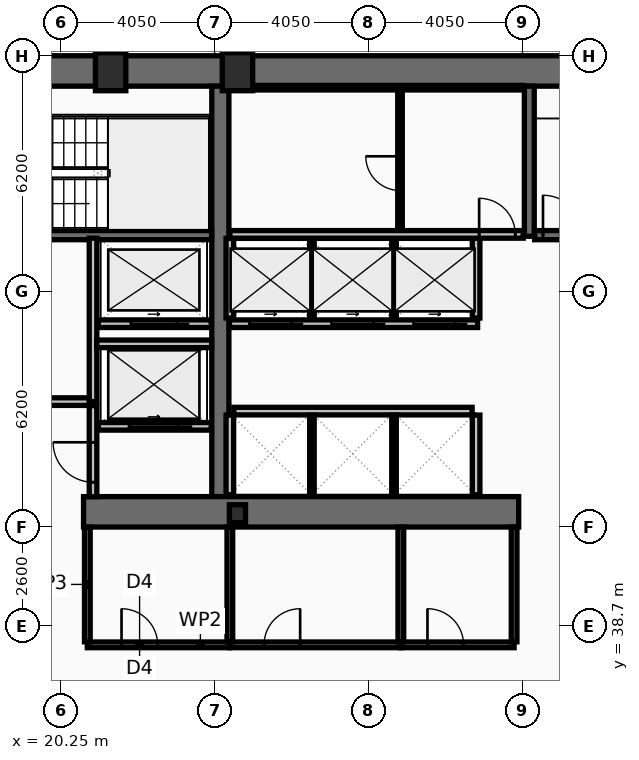
"""IFC4 building model, lengths in metres.
Left out: names, types, materials, properties, quantities, classifications, styles, units other than length and angle.
Written with IfcOpenShell. Run it as: python <this file> out.ifc"""

import sys

from ifc_helpers import new_model, si_unit, direction, frame, frame_2d, origin, origin_2d, place, context, subcontext, project, spatial, rectangle, hollow_rectangle, i_section, extrude, element, fill, save


model = new_model("IFC4")
c1 = context("Model", 3, precision=1e-05, world=origin(), true_north=direction((0.0, 1.0)))
c2 = subcontext(c1, "Body", "Model", "MODEL_VIEW")
j1 = project(units=[si_unit("LENGTHUNIT", "METRE"), si_unit("PLANEANGLEUNIT", "RADIAN")], contexts=[c1])
p1 = place(None, origin())
s1 = spatial("IfcSite", under=j1, at=p1, CompositionType="ELEMENT")
p2 = place(p1, origin())
s2 = spatial("IfcBuilding", under=s1, at=p2, CompositionType="ELEMENT")
p3 = place(p2, frame((0.0, 0.0, 69.8)))
s3 = spatial("IfcBuildingStorey", under=s2, at=p3, CompositionType="ELEMENT", Elevation=69.8)
p4 = place(p3, frame((16.2, 53.3, 0.0), z_axis=(0.0, 0.0, 1.0), x_axis=(1.0, 0.0, 0.0)))
e1 = element("IfcWall", 1, at=p4, inside=s3, PredefinedType="SHEAR", context=c2, shape_type="SweptSolid", body=[
    extrude(rectangle(XDim=40.5, YDim=0.8, at=frame_2d((20.25, 0.0))), origin(), (0.0, 0.0, 1.0), 3.82),
])
p5 = place(p3, frame((24.45, 42.1, 0.0), z_axis=(0.0, 0.0, 1.0), x_axis=(0.0, 1.0, 0.0)))
e2 = element("IfcWall", 2, at=p5, inside=s3, PredefinedType="SHEAR", context=c2, shape_type="SweptSolid", body=[
    extrude(rectangle(XDim=10.8, YDim=0.45, at=frame_2d((5.4, 0.0))), origin(), (0.0, 0.0, 1.0), 3.82),
])
p6 = place(p3, frame((32.3, 41.7, 0.0), z_axis=(0.0, 0.0, 1.0), x_axis=(-1.0, 0.0, 0.0)))
e3 = element("IfcWall", 3, at=p6, inside=s3, PredefinedType="SHEAR", context=c2, shape_type="SweptSolid", body=[
    extrude(rectangle(XDim=11.45, YDim=0.8, at=frame_2d((5.725, 0.0))), origin(), (0.0, 0.0, 1.0), 3.82),
])
p7 = place(p3, frame((32.58, 48.95, 0.0), z_axis=(0.0, 0.0, 1.0), x_axis=(0.0, 1.0, 0.0)))
e4 = element("IfcWall", 4, at=p7, inside=s3, PredefinedType="SHEAR", context=c2, shape_type="SweptSolid", body=[
    extrude(rectangle(XDim=3.95, YDim=0.26, at=frame_2d((1.975, 0.0))), origin(), (0.0, 0.0, 1.0), 3.82),
])
p8 = place(p3, frame((17.0, 48.98, 0.0), z_axis=(0.0, 0.0, 1.0), x_axis=(1.0, 0.0, 0.0)))
e5 = element("IfcWall", 5, at=p8, inside=s3, PredefinedType="SHEAR", context=c2, shape_type="SweptSolid", body=[
    extrude(rectangle(XDim=7.22, YDim=0.24, at=frame_2d((3.61, 0.0))), origin(), (0.0, 0.0, 1.0), 3.82),
])
p9 = place(p8, frame((0.22, 0.0, 0.0)))
e6 = element("IfcOpeningElement", 6, at=p9, cuts=e5, PredefinedType="OPENING", context=c2, shape_type="SweptSolid", body=[
    extrude(rectangle(XDim=1.05, YDim=2.15, at=frame_2d((0.525, 1.075))), frame((0.0, 0.13, 0.0), z_axis=(0.0, -1.0, 0.0), x_axis=(1.0, 0.0, 0.0)), (0.0, 0.0, 1.0), 0.26),
])
p10 = place(p3, frame((32.72, 48.98, 0.0), z_axis=(0.0, 0.0, 1.0), x_axis=(1.0, 0.0, 0.0)))
e7 = element("IfcWall", 7, at=p10, inside=s3, PredefinedType="SHEAR", context=c2, shape_type="SweptSolid", body=[
    extrude(rectangle(XDim=7.56, YDim=0.24, at=frame_2d((3.78, 0.0))), origin(), (0.0, 0.0, 1.0), 3.82),
])
p11 = place(p10, frame((0.22, 0.0, 0.0)))
e8 = element("IfcOpeningElement", 8, at=p11, cuts=e7, PredefinedType="OPENING", context=c2, shape_type="SweptSolid", body=[
    extrude(rectangle(XDim=1.05, YDim=2.15, at=frame_2d((0.525, 1.075))), frame((0.0, 0.13, 0.0), z_axis=(0.0, -1.0, 0.0), x_axis=(1.0, 0.0, 0.0)), (0.0, 0.0, 1.0), 0.26),
])
for number, where, z_axis, x_axis in (
    (9, (21.562, 53.28, 0.0), (0.0, 0.0, 1.0), (1.0, 0.0, 0.0)),
    (10, (24.9, 53.28, 0.0), (0.0, 0.0, 1.0), (1.0, 0.0, 0.0)),
):
    element("IfcColumn", number, at=place(p3, frame(where, z_axis=z_axis, x_axis=x_axis)), inside=s3, PredefinedType="COLUMN", context=c2, shape_type="SweptSolid", body=[
        extrude(hollow_rectangle(XDim=0.8, YDim=1.0, WallThickness=0.055, at=origin_2d()), origin(), (0.0, 0.0, 1.0), 4.0),
    ])
p12 = place(p3, frame((24.9, 41.65, 0.0), z_axis=(0.0, 0.0, 1.0), x_axis=(1.0, 0.0, 0.0)))
e11 = element("IfcColumn", 11, at=p12, inside=s3, PredefinedType="COLUMN", context=c2, shape_type="SweptSolid", body=[
    extrude(i_section(OverallWidth=0.424, OverallDepth=0.474, WebThickness=0.048, FlangeThickness=0.077, at=origin_2d()), origin(), (0.0, 0.0, 1.0), 4.0),
])
p13 = place(p3, frame((24.21, 43.95, 0.0), z_axis=(0.0, 0.0, 1.0), x_axis=(-1.0, 0.0, 0.0)))
e12 = element("IfcWall", 12, at=p13, inside=s3, PredefinedType="PARTITIONING", context=c2, shape_type="SweptSolid", body=[
    extrude(rectangle(XDim=2.97, YDim=0.2, at=frame_2d((1.485, 0.0))), origin(), (0.0, 0.0, 1.0), 3.82),
])
p14 = place(p13, frame((0.86, 0.0, 0.0)))
e13 = element("IfcOpeningElement", 13, at=p14, cuts=e12, PredefinedType="OPENING", context=c2, shape_type="SweptSolid", body=[
    extrude(rectangle(XDim=1.3, YDim=2.18, at=frame_2d((0.65, 1.09))), frame((0.0, 0.11, 0.0), z_axis=(0.0, -1.0, 0.0), x_axis=(1.0, 0.0, 0.0)), (0.0, 0.0, 1.0), 0.22),
])
p15 = place(p3, frame((24.21, 46.65, 0.0), z_axis=(0.0, 0.0, 1.0), x_axis=(-1.0, 0.0, 0.0)))
e14 = element("IfcWall", 14, at=p15, inside=s3, PredefinedType="PARTITIONING", context=c2, shape_type="SweptSolid", body=[
    extrude(rectangle(XDim=2.97, YDim=0.2, at=frame_2d((1.485, 0.0))), origin(), (0.0, 0.0, 1.0), 3.82),
])
p16 = place(p15, frame((0.91, 0.0, 0.0)))
e15 = element("IfcOpeningElement", 15, at=p16, cuts=e14, PredefinedType="OPENING", context=c2, shape_type="SweptSolid", body=[
    extrude(rectangle(XDim=1.2, YDim=2.18, at=frame_2d((0.6, 1.09))), frame((0.0, 0.11, 0.0), z_axis=(0.0, -1.0, 0.0), x_axis=(1.0, 0.0, 0.0)), (0.0, 0.0, 1.0), 0.22),
])
p17 = place(p3, frame((31.22, 46.65, 0.0), z_axis=(0.0, 0.0, 1.0), x_axis=(-1.0, 0.0, 0.0)))
e16 = element("IfcWall", 16, at=p17, inside=s3, PredefinedType="PARTITIONING", context=c2, shape_type="SweptSolid", body=[
    extrude(rectangle(XDim=6.53, YDim=0.2, at=frame_2d((3.265, 0.0))), origin(), (0.0, 0.0, 1.0), 3.82),
])
p18 = place(p17, frame((4.9, 0.0, 0.0)))
e17 = element("IfcOpeningElement", 17, at=p18, cuts=e16, PredefinedType="OPENING", context=c2, shape_type="SweptSolid", body=[
    extrude(rectangle(XDim=1.1, YDim=2.18, at=frame_2d((0.55, 1.09))), frame((0.0, 0.11, 0.0), z_axis=(0.0, -1.0, 0.0), x_axis=(1.0, 0.0, 0.0)), (0.0, 0.0, 1.0), 0.22),
])
p19 = place(p17, frame((2.74, 0.0, 0.0)))
e18 = element("IfcOpeningElement", 18, at=p19, cuts=e16, PredefinedType="OPENING", context=c2, shape_type="SweptSolid", body=[
    extrude(rectangle(XDim=1.1, YDim=2.18, at=frame_2d((0.55, 1.09))), frame((0.0, 0.11, 0.0), z_axis=(0.0, -1.0, 0.0), x_axis=(1.0, 0.0, 0.0)), (0.0, 0.0, 1.0), 0.22),
])
p20 = place(p17, frame((0.58, 0.0, 0.0)))
e19 = element("IfcOpeningElement", 19, at=p20, cuts=e16, PredefinedType="OPENING", context=c2, shape_type="SweptSolid", body=[
    extrude(rectangle(XDim=1.1, YDim=2.18, at=frame_2d((0.55, 1.09))), frame((0.0, 0.11, 0.0), z_axis=(0.0, -1.0, 0.0), x_axis=(1.0, 0.0, 0.0)), (0.0, 0.0, 1.0), 0.22),
])
p21 = place(p3, frame((21.1, 44.6, 0.0), z_axis=(0.0, 0.0, 1.0), x_axis=(0.0, 1.0, 0.0)))
e20 = element("IfcWall", 20, at=p21, inside=s3, PredefinedType="PARTITIONING", context=c2, shape_type="SweptSolid", body=[
    extrude(rectangle(XDim=4.3, YDim=0.2, at=frame_2d((2.15, 0.0))), origin(), (0.0, 0.0, 1.0), 3.82),
])
p22 = place(p3, frame((17.0, 44.6, 0.0), z_axis=(0.0, 0.0, 1.0), x_axis=(1.0, 0.0, 0.0)))
e21 = element("IfcWall", 21, at=p22, inside=s3, PredefinedType="PARTITIONING", context=c2, shape_type="SweptSolid", body=[
    extrude(rectangle(XDim=4.0, YDim=0.2, at=frame_2d((2.0, 0.0))), origin(), (0.0, 0.0, 1.0), 3.82),
])
p23 = place(p22, frame((1.25, 0.0, 0.0)))
e22 = element("IfcOpeningElement", 22, at=p23, cuts=e21, PredefinedType="OPENING", context=c2, shape_type="SweptSolid", body=[
    extrude(rectangle(XDim=1.05, YDim=2.15, at=frame_2d((0.525, 1.075))), frame((0.0, 0.11, 0.0), z_axis=(0.0, -1.0, 0.0), x_axis=(1.0, 0.0, 0.0)), (0.0, 0.0, 1.0), 0.22),
])
p24 = place(p3, frame((21.2, 46.12, 0.0), z_axis=(0.0, 0.0, 1.0), x_axis=(1.0, 0.0, 0.0)))
e23 = element("IfcWall", 23, at=p24, inside=s3, PredefinedType="PARTITIONING", context=c2, shape_type="SweptSolid", body=[
    extrude(rectangle(XDim=3.02, YDim=0.2, at=frame_2d((1.51, 0.0))), origin(), (0.0, 0.0, 1.0), 3.82),
])
p25 = place(p3, frame((21.1, 42.1, 0.0), z_axis=(0.0, 0.0, 1.0), x_axis=(0.0, 1.0, 0.0)))
e24 = element("IfcWall", 24, at=p25, inside=s3, PredefinedType="PARTITIONING", context=c2, shape_type="SweptSolid", body=[
    extrude(rectangle(XDim=2.395, YDim=0.2, at=frame_2d((1.198, 0.0))), origin(), (0.0, 0.0, 1.0), 3.82),
])
p26 = place(p25, frame((0.38, 0.0, 0.0)))
e25 = element("IfcOpeningElement", 25, at=p26, cuts=e24, PredefinedType="OPENING", context=c2, shape_type="SweptSolid", body=[
    extrude(rectangle(XDim=1.05, YDim=2.15, at=frame_2d((0.525, 1.075))), frame((0.0, 0.11, 0.0), z_axis=(0.0, -1.0, 0.0), x_axis=(1.0, 0.0, 0.0)), (0.0, 0.0, 1.0), 0.22),
])
for number, where, z_axis, x_axis in (
    (26, (24.7, 46.8, 0.0), (0.0, 0.0, 1.0), (0.0, 1.0, 0.0)),
    (27, (31.18, 46.8, 0.0), (0.0, 0.0, 1.0), (0.0, 1.0, 0.0)),
):
    element("IfcWall", number, at=place(p3, frame(where, z_axis=z_axis, x_axis=x_axis)), inside=s3, PredefinedType="PARTITIONING", context=c2, shape_type="SweptSolid", body=[
        extrude(rectangle(XDim=2.095, YDim=0.2, at=frame_2d((1.047, 0.0))), origin(), (0.0, 0.0, 1.0), 3.82),
    ])
for number, where, z_axis, x_axis in (
    (28, (26.86, 46.8, 0.0), (0.0, 0.0, 1.0), (0.0, 1.0, 0.0)),
    (29, (29.02, 46.8, 0.0), (0.0, 0.0, 1.0), (0.0, 1.0, 0.0)),
):
    element("IfcWall", number, at=place(p3, frame(where, z_axis=z_axis, x_axis=x_axis)), inside=s3, PredefinedType="PARTITIONING", context=c2, shape_type="SweptSolid", body=[
        extrude(rectangle(XDim=2.095, YDim=0.12, at=frame_2d((1.047, 0.0))), origin(), (0.0, 0.0, 1.0), 3.82),
    ])
p27 = place(p3, frame((24.805, 44.35, 0.0), z_axis=(0.0, 0.0, 1.0), x_axis=(1.0, 0.0, 0.0)))
e30 = element("IfcWall", 30, at=p27, inside=s3, PredefinedType="PARTITIONING", context=c2, shape_type="SweptSolid", body=[
    extrude(rectangle(XDim=6.27, YDim=0.2, at=frame_2d((3.135, 0.0))), origin(), (0.0, 0.0, 1.0), 3.82),
])
for number, where, z_axis, x_axis in (
    (31, (24.7, 42.15, 0.0), (0.0, 0.0, 1.0), (0.0, 1.0, 0.0)),
    (32, (31.18, 42.15, 0.0), (0.0, 0.0, 1.0), (0.0, 1.0, 0.0)),
):
    element("IfcWall", number, at=place(p3, frame(where, z_axis=z_axis, x_axis=x_axis)), inside=s3, PredefinedType="PARTITIONING", context=c2, shape_type="SweptSolid", body=[
        extrude(rectangle(XDim=2.095, YDim=0.2, at=frame_2d((1.048, 0.0))), origin(), (0.0, 0.0, 1.0), 3.82),
    ])
for number, where, z_axis, x_axis in (
    (33, (26.86, 42.15, 0.0), (0.0, 0.0, 1.0), (0.0, 1.0, 0.0)),
    (34, (29.02, 42.15, 0.0), (0.0, 0.0, 1.0), (0.0, 1.0, 0.0)),
):
    element("IfcWall", number, at=place(p3, frame(where, z_axis=z_axis, x_axis=x_axis)), inside=s3, PredefinedType="PARTITIONING", context=c2, shape_type="SweptSolid", body=[
        extrude(rectangle(XDim=2.095, YDim=0.12, at=frame_2d((1.048, 0.0))), origin(), (0.0, 0.0, 1.0), 3.82),
    ])
p28 = place(p3, frame((24.7, 52.86, 0.0), z_axis=(0.0, 0.0, 1.0), x_axis=(1.0, 0.0, 0.0)))
e35 = element("IfcWall", 35, at=p28, inside=s3, PredefinedType="PARTITIONING", context=c2, shape_type="SweptSolid", body=[
    extrude(rectangle(XDim=7.72, YDim=0.12, at=frame_2d((3.86, 0.0))), origin(), (0.0, 0.0, 1.0), 3.82),
])
p29 = place(p3, frame((24.7, 49.0, 0.0), z_axis=(0.0, 0.0, 1.0), x_axis=(1.0, 0.0, 0.0)))
e36 = element("IfcWall", 36, at=p29, inside=s3, PredefinedType="PARTITIONING", context=c2, shape_type="SweptSolid", body=[
    extrude(rectangle(XDim=7.72, YDim=0.2, at=frame_2d((3.86, 0.0))), origin(), (0.0, 0.0, 1.0), 3.82),
])
p30 = place(p29, frame((6.56, 0.0, 0.0)))
e37 = element("IfcOpeningElement", 37, at=p30, cuts=e36, PredefinedType="OPENING", context=c2, shape_type="SweptSolid", body=[
    extrude(rectangle(XDim=0.95, YDim=2.1, at=frame_2d((0.475, 1.05))), frame((0.0, 0.11, 0.0), z_axis=(0.0, -1.0, 0.0), x_axis=(1.0, 0.0, 0.0)), (0.0, 0.0, 1.0), 0.22),
])
p31 = place(p3, frame((29.177, 49.105, 0.0), z_axis=(0.0, 0.0, 1.0), x_axis=(0.0, 1.0, 0.0)))
e38 = element("IfcWall", 38, at=p31, inside=s3, PredefinedType="PARTITIONING", context=c2, shape_type="SweptSolid", body=[
    extrude(rectangle(XDim=3.69, YDim=0.12, at=frame_2d((1.845, 0.0))), origin(), (0.0, 0.0, 1.0), 3.82),
])
p32 = place(p31, frame((1.05, 0.0, 0.0)))
e39 = element("IfcOpeningElement", 39, at=p32, cuts=e38, PredefinedType="OPENING", context=c2, shape_type="SweptSolid", body=[
    extrude(rectangle(XDim=0.9, YDim=2.05, at=frame_2d((0.45, 1.025))), frame((0.0, 0.07, 0.0), z_axis=(0.0, -1.0, 0.0), x_axis=(1.0, 0.0, 0.0)), (0.0, 0.0, 1.0), 0.14),
])
p33 = place(p3, frame((20.95, 38.2, 0.0), z_axis=(0.0, 0.0, 1.0), x_axis=(1.0, 0.0, 0.0)))
e40 = element("IfcWall", 40, at=p33, inside=s3, PredefinedType="PARTITIONING", context=c2, shape_type="SweptSolid", body=[
    extrude(rectangle(XDim=3.75, YDim=0.15, at=frame_2d((1.875, 0.0))), origin(), (0.0, 0.0, 1.0), 3.01),
])
p34 = place(p33, frame((0.9, 0.0, 0.0)))
e41 = element("IfcOpeningElement", 41, at=p34, cuts=e40, PredefinedType="OPENING", context=c2, shape_type="SweptSolid", body=[
    extrude(rectangle(XDim=0.95, YDim=2.05, at=frame_2d((0.475, 1.025))), frame((0.0, 0.085, 0.0), z_axis=(0.0, -1.0, 0.0), x_axis=(1.0, 0.0, 0.0)), (0.0, 0.0, 1.0), 0.17),
])
p35 = place(p3, frame((24.7, 38.2, 0.0), z_axis=(0.0, 0.0, 1.0), x_axis=(1.0, 0.0, 0.0)))
e42 = element("IfcWall", 42, at=p35, inside=s3, PredefinedType="PARTITIONING", context=c2, shape_type="SweptSolid", body=[
    extrude(rectangle(XDim=4.5, YDim=0.15, at=frame_2d((2.25, 0.0))), origin(), (0.0, 0.0, 1.0), 3.01),
])
p36 = place(p35, frame((0.9, 0.0, 0.0)))
e43 = element("IfcOpeningElement", 43, at=p36, cuts=e42, PredefinedType="OPENING", context=c2, shape_type="SweptSolid", body=[
    extrude(rectangle(XDim=0.95, YDim=2.05, at=frame_2d((0.475, 1.025))), frame((0.0, 0.085, 0.0), z_axis=(0.0, -1.0, 0.0), x_axis=(1.0, 0.0, 0.0)), (0.0, 0.0, 1.0), 0.17),
])
p37 = place(p3, frame((29.2, 38.2, 0.0), z_axis=(0.0, 0.0, 1.0), x_axis=(1.0, 0.0, 0.0)))
e44 = element("IfcWall", 44, at=p37, inside=s3, PredefinedType="PARTITIONING", context=c2, shape_type="SweptSolid", body=[
    extrude(rectangle(XDim=2.98, YDim=0.15, at=frame_2d((1.49, 0.0))), origin(), (0.0, 0.0, 1.0), 3.01),
])
p38 = place(p37, frame((0.7, 0.0, 0.0)))
e45 = element("IfcOpeningElement", 45, at=p38, cuts=e44, PredefinedType="OPENING", context=c2, shape_type="SweptSolid", body=[
    extrude(rectangle(XDim=0.95, YDim=2.05, at=frame_2d((0.475, 1.025))), frame((0.0, 0.085, 0.0), z_axis=(0.0, -1.0, 0.0), x_axis=(1.0, 0.0, 0.0)), (0.0, 0.0, 1.0), 0.17),
])
p39 = place(p3, frame((20.95, 38.28, 0.0), z_axis=(0.0, 0.0, 1.0), x_axis=(0.0, 1.0, 0.0)))
e46 = element("IfcWall", 46, at=p39, inside=s3, PredefinedType="PARTITIONING", context=c2, shape_type="SweptSolid", body=[
    extrude(rectangle(XDim=3.02, YDim=0.15, at=frame_2d((1.51, 0.0))), origin(), (0.0, 0.0, 1.0), 3.82),
])
p40 = place(p3, frame((24.7, 38.28, 0.0), z_axis=(0.0, 0.0, 1.0), x_axis=(0.0, 1.0, 0.0)))
e47 = element("IfcWall", 47, at=p40, inside=s3, PredefinedType="PARTITIONING", context=c2, shape_type="SweptSolid", body=[
    extrude(rectangle(XDim=3.02, YDim=0.15, at=frame_2d((1.51, 0.0))), origin(), (0.0, 0.0, 1.0), 3.01),
])
for number, where, z_axis, x_axis in (
    (48, (29.2, 38.28, 0.0), (0.0, 0.0, 1.0), (0.0, 1.0, 0.0)),
    (49, (32.18, 38.28, 0.0), (0.0, 0.0, 1.0), (0.0, 1.0, 0.0)),
):
    element("IfcWall", number, at=place(p3, frame(where, z_axis=z_axis, x_axis=x_axis)), inside=s3, PredefinedType="PARTITIONING", context=c2, shape_type="SweptSolid", body=[
        extrude(rectangle(XDim=3.02, YDim=0.15, at=frame_2d((1.51, 0.0))), origin(), (0.0, 0.0, 1.0), 3.82),
    ])
p41 = place(p11, origin())
e50 = element("IfcDoor", 50, at=p41, inside=s3, OperationType="SINGLE_SWING_LEFT", PredefinedType="DOOR", context=c2, shape_type="SweptSolid", body=[
    extrude(rectangle(XDim=1.05, YDim=2.15, at=frame_2d((0.525, 1.075))), frame((0.0, 0.025, 0.0), z_axis=(0.0, -1.0, 0.0), x_axis=(1.0, 0.0, 0.0)), (0.0, 0.0, 1.0), 0.05),
])
fill(e8, e50)
p42 = place(p14, origin())
e51 = element("IfcDoor", 51, at=p42, inside=s3, OperationType="SLIDING_TO_LEFT", PredefinedType="DOOR", context=c2, shape_type="SweptSolid", body=[
    extrude(rectangle(XDim=1.3, YDim=2.18, at=frame_2d((0.65, 1.09))), frame((0.0, 0.025, 0.0), z_axis=(0.0, -1.0, 0.0), x_axis=(1.0, 0.0, 0.0)), (0.0, 0.0, 1.0), 0.05),
])
fill(e13, e51)
p43 = place(p16, origin())
e52 = element("IfcDoor", 52, at=p43, inside=s3, OperationType="SLIDING_TO_LEFT", PredefinedType="DOOR", context=c2, shape_type="SweptSolid", body=[
    extrude(rectangle(XDim=1.2, YDim=2.18, at=frame_2d((0.6, 1.09))), frame((0.0, 0.025, 0.0), z_axis=(0.0, -1.0, 0.0), x_axis=(1.0, 0.0, 0.0)), (0.0, 0.0, 1.0), 0.05),
])
fill(e15, e52)
p44 = place(p18, origin())
e53 = element("IfcDoor", 53, at=p44, inside=s3, OperationType="SLIDING_TO_LEFT", PredefinedType="DOOR", context=c2, shape_type="SweptSolid", body=[
    extrude(rectangle(XDim=1.1, YDim=2.18, at=frame_2d((0.55, 1.09))), frame((0.0, 0.025, 0.0), z_axis=(0.0, -1.0, 0.0), x_axis=(1.0, 0.0, 0.0)), (0.0, 0.0, 1.0), 0.05),
])
fill(e17, e53)
p45 = place(p19, origin())
e54 = element("IfcDoor", 54, at=p45, inside=s3, OperationType="SLIDING_TO_LEFT", PredefinedType="DOOR", context=c2, shape_type="SweptSolid", body=[
    extrude(rectangle(XDim=1.1, YDim=2.18, at=frame_2d((0.55, 1.09))), frame((0.0, 0.025, 0.0), z_axis=(0.0, -1.0, 0.0), x_axis=(1.0, 0.0, 0.0)), (0.0, 0.0, 1.0), 0.05),
])
fill(e18, e54)
p46 = place(p20, origin())
e55 = element("IfcDoor", 55, at=p46, inside=s3, OperationType="SLIDING_TO_LEFT", PredefinedType="DOOR", context=c2, shape_type="SweptSolid", body=[
    extrude(rectangle(XDim=1.1, YDim=2.18, at=frame_2d((0.55, 1.09))), frame((0.0, 0.025, 0.0), z_axis=(0.0, -1.0, 0.0), x_axis=(1.0, 0.0, 0.0)), (0.0, 0.0, 1.0), 0.05),
])
fill(e19, e55)
p47 = place(p26, origin())
e56 = element("IfcDoor", 56, at=p47, inside=s3, OperationType="SINGLE_SWING_RIGHT", PredefinedType="DOOR", context=c2, shape_type="SweptSolid", body=[
    extrude(rectangle(XDim=1.05, YDim=2.15, at=frame_2d((0.525, 1.075))), frame((0.0, 0.025, 0.0), z_axis=(0.0, -1.0, 0.0), x_axis=(1.0, 0.0, 0.0)), (0.0, 0.0, 1.0), 0.05),
])
fill(e25, e56)
p48 = place(p30, origin())
e57 = element("IfcDoor", 57, at=p48, inside=s3, OperationType="SINGLE_SWING_LEFT", PredefinedType="DOOR", context=c2, shape_type="SweptSolid", body=[
    extrude(rectangle(XDim=0.95, YDim=2.1, at=frame_2d((0.475, 1.05))), frame((0.0, 0.025, 0.0), z_axis=(0.0, -1.0, 0.0), x_axis=(1.0, 0.0, 0.0)), (0.0, 0.0, 1.0), 0.05),
])
fill(e37, e57)
p49 = place(p32, origin())
e58 = element("IfcDoor", 58, at=p49, inside=s3, OperationType="SINGLE_SWING_RIGHT", PredefinedType="DOOR", context=c2, shape_type="SweptSolid", body=[
    extrude(rectangle(XDim=0.9, YDim=2.05, at=frame_2d((0.45, 1.025))), frame((0.0, 0.025, 0.0), z_axis=(0.0, -1.0, 0.0), x_axis=(1.0, 0.0, 0.0)), (0.0, 0.0, 1.0), 0.05),
])
fill(e39, e58)
p50 = place(p34, origin())
e59 = element("IfcDoor", 59, at=p50, inside=s3, OperationType="SINGLE_SWING_LEFT", PredefinedType="DOOR", context=c2, shape_type="SweptSolid", body=[
    extrude(rectangle(XDim=0.95, YDim=2.05, at=frame_2d((0.475, 1.025))), frame((0.0, 0.025, 0.0), z_axis=(0.0, -1.0, 0.0), x_axis=(1.0, 0.0, 0.0)), (0.0, 0.0, 1.0), 0.05),
])
fill(e41, e59)
p51 = place(p36, origin())
e60 = element("IfcDoor", 60, at=p51, inside=s3, OperationType="SINGLE_SWING_RIGHT", PredefinedType="DOOR", context=c2, shape_type="SweptSolid", body=[
    extrude(rectangle(XDim=0.95, YDim=2.05, at=frame_2d((0.475, 1.025))), frame((0.0, 0.025, 0.0), z_axis=(0.0, -1.0, 0.0), x_axis=(1.0, 0.0, 0.0)), (0.0, 0.0, 1.0), 0.05),
])
fill(e43, e60)
p52 = place(p38, origin())
e61 = element("IfcDoor", 61, at=p52, inside=s3, OperationType="SINGLE_SWING_LEFT", PredefinedType="DOOR", context=c2, shape_type="SweptSolid", body=[
    extrude(rectangle(XDim=0.95, YDim=2.05, at=frame_2d((0.475, 1.025))), frame((0.0, 0.025, 0.0), z_axis=(0.0, -1.0, 0.0), x_axis=(1.0, 0.0, 0.0)), (0.0, 0.0, 1.0), 0.05),
])
fill(e45, e61)
save(model, sys.argv[1])
